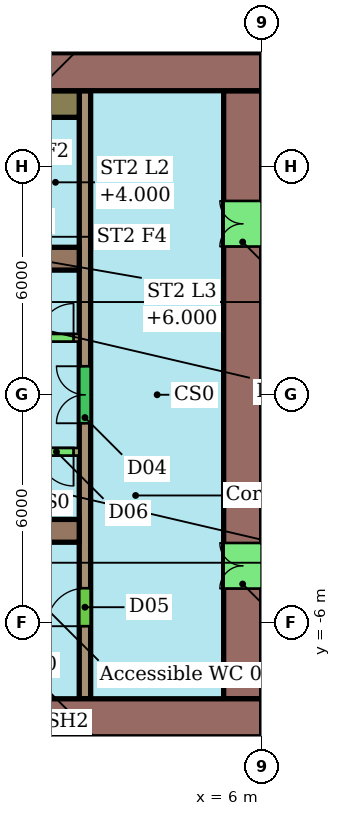
"""IFC4 building model, lengths in metres.
Left out: names, types, materials, properties, quantities, classifications, styles, units other than length and angle.
Written with IfcOpenShell. Run it as: python <this file> out.ifc"""

import sys

from ifc_helpers import new_model, si_unit, direction, frame, frame_2d, origin, place, context, subcontext, project, spatial, rectangle, extrude, element, fill, save


model = new_model("IFC4")
c1 = context("Model", 3, precision=1e-05, world=origin(), true_north=direction((0.0, 1.0)))
c2 = subcontext(c1, "Body", "Model", "MODEL_VIEW")
j1 = project(units=[si_unit("LENGTHUNIT", "METRE"), si_unit("PLANEANGLEUNIT", "RADIAN")], contexts=[c1])
p1 = place(None, origin())
s1 = spatial("IfcSite", under=j1, at=p1, CompositionType="ELEMENT")
p2 = place(p1, origin())
s2 = spatial("IfcBuilding", under=s1, at=p2, CompositionType="ELEMENT")
p3 = place(p2, origin())
s3 = spatial("IfcBuildingStorey", under=s2, at=p3, CompositionType="ELEMENT", Elevation=0.0)
p4 = place(p3, frame((6.0, 8.5, -2.0), z_axis=(0.0, 0.0, 1.0), x_axis=(-1.0, 0.0, 0.0)))
e1 = element("IfcWall", 1, at=p4, inside=s3, PredefinedType="SHEAR", context=c2, shape_type="SweptSolid", body=[
    extrude(rectangle(XDim=12.0, YDim=1.0, at=frame_2d((6.0, 0.0))), origin(), (0.0, 0.0, 1.0), 9.7),
])
p5 = place(p4, frame((5.6, 0.0, 2.0)))
e2 = element("IfcOpeningElement", 2, at=p5, cuts=e1, PredefinedType="OPENING", context=c2, shape_type="SweptSolid", body=[
    extrude(rectangle(XDim=1.2, YDim=2.1, at=frame_2d((0.6, 1.05))), frame((0.0, 0.51, 0.0), z_axis=(0.0, -1.0, 0.0), x_axis=(1.0, 0.0, 0.0)), (0.0, 0.0, 1.0), 1.02),
])
p6 = place(p3, frame((-18.0, -8.5, -2.0), z_axis=(0.0, 0.0, 1.0), x_axis=(1.0, 0.0, 0.0)))
e3 = element("IfcWall", 3, at=p6, inside=s3, PredefinedType="SHEAR", context=c2, shape_type="SweptSolid", body=[
    extrude(rectangle(XDim=24.0, YDim=1.0, at=frame_2d((12.0, 0.0))), origin(), (0.0, 0.0, 1.0), 9.7),
])
p7 = place(p6, frame((6.0, 0.0, 2.0)))
e4 = element("IfcOpeningElement", 4, at=p7, cuts=e3, PredefinedType="OPENING", context=c2, shape_type="SweptSolid", body=[
    extrude(rectangle(XDim=1.2, YDim=2.1, at=frame_2d((0.6, 1.05))), frame((0.0, 0.51, 0.0), z_axis=(0.0, -1.0, 0.0), x_axis=(1.0, 0.0, 0.0)), (0.0, 0.0, 1.0), 1.02),
])
p8 = place(p3, frame((5.5, -8.0, -2.0), z_axis=(0.0, 0.0, 1.0), x_axis=(0.0, 1.0, 0.0)))
e5 = element("IfcWall", 5, at=p8, inside=s3, PredefinedType="SHEAR", context=c2, shape_type="SweptSolid", body=[
    extrude(rectangle(XDim=16.0, YDim=1.0, at=frame_2d((8.0, 0.0))), origin(), (0.0, 0.0, 1.0), 9.7),
])
p9 = place(p8, frame((2.9, 0.0, 2.0)))
e6 = element("IfcOpeningElement", 6, at=p9, cuts=e5, PredefinedType="OPENING", context=c2, shape_type="SweptSolid", body=[
    extrude(rectangle(XDim=1.2, YDim=2.1, at=frame_2d((0.6, 1.05))), frame((0.0, 0.51, 0.0), z_axis=(0.0, -1.0, 0.0), x_axis=(1.0, 0.0, 0.0)), (0.0, 0.0, 1.0), 1.02),
])
p10 = place(p8, frame((11.9, 0.0, 2.0)))
e7 = element("IfcOpeningElement", 7, at=p10, cuts=e5, PredefinedType="OPENING", context=c2, shape_type="SweptSolid", body=[
    extrude(rectangle(XDim=1.2, YDim=2.1, at=frame_2d((0.6, 1.05))), frame((0.0, 0.51, 0.0), z_axis=(0.0, -1.0, 0.0), x_axis=(1.0, 0.0, 0.0)), (0.0, 0.0, 1.0), 1.02),
])
for number, where, z_axis, x_axis in (
    (8, (-6.0, 3.58, -2.0), (0.0, 0.0, 1.0), (1.0, 0.0, 0.0)),
    (9, (-6.0, -3.58, -2.0), (0.0, 0.0, 1.0), (1.0, 0.0, 0.0)),
):
    element("IfcWall", number, at=place(p3, frame(where, z_axis=z_axis, x_axis=x_axis)), inside=s3, PredefinedType="SHEAR", context=c2, shape_type="SweptSolid", body=[
        extrude(rectangle(XDim=7.2, YDim=0.6, at=frame_2d((3.6, 0.0))), origin(), (0.0, 0.0, 1.0), 9.7),
    ])
p11 = place(p3, frame((1.35, -8.0, -2.0), z_axis=(0.0, 0.0, 1.0), x_axis=(0.0, 1.0, 0.0)))
e10 = element("IfcWall", 10, at=p11, inside=s3, PredefinedType="SHEAR", context=c2, shape_type="SweptSolid", body=[
    extrude(rectangle(XDim=16.0, YDim=0.3, at=frame_2d((8.0, 0.0))), origin(), (0.0, 0.0, 1.0), 9.7),
])
p12 = place(p11, frame((1.91, 0.0, 2.0)))
e11 = element("IfcOpeningElement", 11, at=p12, cuts=e10, PredefinedType="OPENING", context=c2, shape_type="SweptSolid", body=[
    extrude(rectangle(XDim=1.0, YDim=2.1, at=frame_2d((0.5, 1.05))), frame((0.0, 0.16, 0.0), z_axis=(0.0, -1.0, 0.0), x_axis=(1.0, 0.0, 0.0)), (0.0, 0.0, 1.0), 0.32),
])
p13 = place(p11, frame((7.25, 0.0, 2.0)))
e12 = element("IfcOpeningElement", 12, at=p13, cuts=e10, PredefinedType="OPENING", context=c2, shape_type="SweptSolid", body=[
    extrude(rectangle(XDim=1.5, YDim=2.1, at=frame_2d((0.75, 1.05))), frame((0.0, 0.16, 0.0), z_axis=(0.0, -1.0, 0.0), x_axis=(1.0, 0.0, 0.0)), (0.0, 0.0, 1.0), 0.32),
])
p14 = place(p3, frame((-13.2, 1.5, -2.0), z_axis=(0.0, 0.0, 1.0), x_axis=(1.0, 0.0, 0.0)))
e13 = element("IfcWall", 13, at=p14, inside=s3, PredefinedType="SHEAR", context=c2, shape_type="SweptSolid", body=[
    extrude(rectangle(XDim=14.4, YDim=0.2, at=frame_2d((7.2, 0.0))), origin(), (0.0, 0.0, 1.0), 9.7),
])
p15 = place(p14, frame((0.546, 0.0, 2.0)))
e14 = element("IfcOpeningElement", 14, at=p15, cuts=e13, PredefinedType="OPENING", context=c2, shape_type="SweptSolid", body=[
    extrude(rectangle(XDim=1.1, YDim=2.1, at=frame_2d((0.55, 1.05))), frame((0.0, 0.11, 0.0), z_axis=(0.0, -1.0, 0.0), x_axis=(1.0, 0.0, 0.0)), (0.0, 0.0, 1.0), 0.22),
])
p16 = place(p14, frame((2.988, 0.0, 2.0)))
e15 = element("IfcOpeningElement", 15, at=p16, cuts=e13, PredefinedType="OPENING", context=c2, shape_type="SweptSolid", body=[
    extrude(rectangle(XDim=1.1, YDim=2.1, at=frame_2d((0.55, 1.05))), frame((0.0, 0.11, 0.0), z_axis=(0.0, -1.0, 0.0), x_axis=(1.0, 0.0, 0.0)), (0.0, 0.0, 1.0), 0.22),
])
p17 = place(p14, frame((5.429, 0.0, 2.0)))
e16 = element("IfcOpeningElement", 16, at=p17, cuts=e13, PredefinedType="OPENING", context=c2, shape_type="SweptSolid", body=[
    extrude(rectangle(XDim=1.1, YDim=2.1, at=frame_2d((0.55, 1.05))), frame((0.0, 0.11, 0.0), z_axis=(0.0, -1.0, 0.0), x_axis=(1.0, 0.0, 0.0)), (0.0, 0.0, 1.0), 0.22),
])
p18 = place(p14, frame((7.871, 0.0, 2.0)))
e17 = element("IfcOpeningElement", 17, at=p18, cuts=e13, PredefinedType="OPENING", context=c2, shape_type="SweptSolid", body=[
    extrude(rectangle(XDim=1.1, YDim=2.1, at=frame_2d((0.55, 1.05))), frame((0.0, 0.11, 0.0), z_axis=(0.0, -1.0, 0.0), x_axis=(1.0, 0.0, 0.0)), (0.0, 0.0, 1.0), 0.22),
])
p19 = place(p14, frame((13.35, 0.0, 2.0)))
e18 = element("IfcOpeningElement", 18, at=p19, cuts=e13, PredefinedType="OPENING", context=c2, shape_type="SweptSolid", body=[
    extrude(rectangle(XDim=0.9, YDim=2.1, at=frame_2d((0.45, 1.05))), frame((0.0, 0.11, 0.0), z_axis=(0.0, -1.0, 0.0), x_axis=(1.0, 0.0, 0.0)), (0.0, 0.0, 1.0), 0.22),
])
p20 = place(p3, frame((1.2, -1.5, -2.0), z_axis=(0.0, 0.0, 1.0), x_axis=(-1.0, 0.0, 0.0)))
e19 = element("IfcWall", 19, at=p20, inside=s3, PredefinedType="SHEAR", context=c2, shape_type="SweptSolid", body=[
    extrude(rectangle(XDim=14.4, YDim=0.2, at=frame_2d((7.2, 0.0))), origin(), (0.0, 0.0, 1.0), 9.7),
])
p21 = place(p20, frame((7.821, 0.0, 2.0)))
e20 = element("IfcOpeningElement", 20, at=p21, cuts=e19, PredefinedType="OPENING", context=c2, shape_type="SweptSolid", body=[
    extrude(rectangle(XDim=1.2, YDim=2.1, at=frame_2d((0.6, 1.05))), frame((0.0, 0.11, 0.0), z_axis=(0.0, -1.0, 0.0), x_axis=(1.0, 0.0, 0.0)), (0.0, 0.0, 1.0), 0.22),
])
p22 = place(p20, frame((5.429, 0.0, 2.0)))
e21 = element("IfcOpeningElement", 21, at=p22, cuts=e19, PredefinedType="OPENING", context=c2, shape_type="SweptSolid", body=[
    extrude(rectangle(XDim=1.1, YDim=2.1, at=frame_2d((0.55, 1.05))), frame((0.0, 0.11, 0.0), z_axis=(0.0, -1.0, 0.0), x_axis=(1.0, 0.0, 0.0)), (0.0, 0.0, 1.0), 0.22),
])
p23 = place(p20, frame((2.988, 0.0, 2.0)))
e22 = element("IfcOpeningElement", 22, at=p23, cuts=e19, PredefinedType="OPENING", context=c2, shape_type="SweptSolid", body=[
    extrude(rectangle(XDim=1.1, YDim=2.1, at=frame_2d((0.55, 1.05))), frame((0.0, 0.11, 0.0), z_axis=(0.0, -1.0, 0.0), x_axis=(1.0, 0.0, 0.0)), (0.0, 0.0, 1.0), 0.22),
])
p24 = place(p20, frame((0.15, 0.0, 2.0)))
e23 = element("IfcOpeningElement", 23, at=p24, cuts=e19, PredefinedType="OPENING", context=c2, shape_type="SweptSolid", body=[
    extrude(rectangle(XDim=0.9, YDim=2.1, at=frame_2d((0.45, 1.05))), frame((0.0, 0.11, 0.0), z_axis=(0.0, -1.0, 0.0), x_axis=(1.0, 0.0, 0.0)), (0.0, 0.0, 1.0), 0.22),
])
p25 = place(p3, frame((0.4, 7.65, -2.0), z_axis=(0.0, 0.0, 1.0), x_axis=(1.0, 0.0, 0.0)))
e24 = element("IfcWall", 24, at=p25, inside=s3, PredefinedType="SHEAR", context=c2, shape_type="SweptSolid", body=[
    extrude(rectangle(XDim=0.8, YDim=0.7, at=frame_2d((0.4, 0.0))), origin(), (0.0, 0.0, 1.0), 9.7),
])
p26 = place(p9, origin())
e25 = element("IfcDoor", 25, at=p26, inside=s3, OperationType="DOUBLE_DOOR_SINGLE_SWING", PredefinedType="NOTDEFINED", context=c2, shape_type="SweptSolid", body=[
    extrude(rectangle(XDim=1.2, YDim=2.1, at=frame_2d((0.6, 1.05))), frame((0.0, 0.025, 0.0), z_axis=(0.0, -1.0, 0.0), x_axis=(1.0, 0.0, 0.0)), (0.0, 0.0, 1.0), 0.05),
])
fill(e6, e25)
p27 = place(p10, origin())
e26 = element("IfcDoor", 26, at=p27, inside=s3, OperationType="DOUBLE_DOOR_SINGLE_SWING", PredefinedType="NOTDEFINED", context=c2, shape_type="SweptSolid", body=[
    extrude(rectangle(XDim=1.2, YDim=2.1, at=frame_2d((0.6, 1.05))), frame((0.0, 0.025, 0.0), z_axis=(0.0, -1.0, 0.0), x_axis=(1.0, 0.0, 0.0)), (0.0, 0.0, 1.0), 0.05),
])
fill(e7, e26)
p28 = place(p12, origin())
e27 = element("IfcDoor", 27, at=p28, inside=s3, OperationType="SINGLE_SWING_LEFT", PredefinedType="NOTDEFINED", context=c2, shape_type="SweptSolid", body=[
    extrude(rectangle(XDim=1.0, YDim=2.1, at=frame_2d((0.5, 1.05))), frame((0.0, 0.025, 0.0), z_axis=(0.0, -1.0, 0.0), x_axis=(1.0, 0.0, 0.0)), (0.0, 0.0, 1.0), 0.05),
])
fill(e11, e27)
p29 = place(p13, origin())
e28 = element("IfcDoor", 28, at=p29, inside=s3, OperationType="DOUBLE_DOOR_SINGLE_SWING", PredefinedType="NOTDEFINED", context=c2, shape_type="SweptSolid", body=[
    extrude(rectangle(XDim=1.5, YDim=2.1, at=frame_2d((0.75, 1.05))), frame((0.0, 0.025, 0.0), z_axis=(0.0, -1.0, 0.0), x_axis=(1.0, 0.0, 0.0)), (0.0, 0.0, 1.0), 0.05),
])
fill(e12, e28)
p30 = place(p19, origin())
e29 = element("IfcDoor", 29, at=p30, inside=s3, OperationType="SINGLE_SWING_RIGHT", PredefinedType="NOTDEFINED", context=c2, shape_type="SweptSolid", body=[
    extrude(rectangle(XDim=0.9, YDim=2.1, at=frame_2d((0.45, 1.05))), frame((0.0, 0.025, 0.0), z_axis=(0.0, -1.0, 0.0), x_axis=(1.0, 0.0, 0.0)), (0.0, 0.0, 1.0), 0.05),
])
fill(e18, e29)
p31 = place(p24, origin())
e30 = element("IfcDoor", 30, at=p31, inside=s3, OperationType="SINGLE_SWING_LEFT", PredefinedType="NOTDEFINED", context=c2, shape_type="SweptSolid", body=[
    extrude(rectangle(XDim=0.9, YDim=2.1, at=frame_2d((0.45, 1.05))), frame((0.0, 0.025, 0.0), z_axis=(0.0, -1.0, 0.0), x_axis=(1.0, 0.0, 0.0)), (0.0, 0.0, 1.0), 0.05),
])
fill(e23, e30)
save(model, sys.argv[1])
